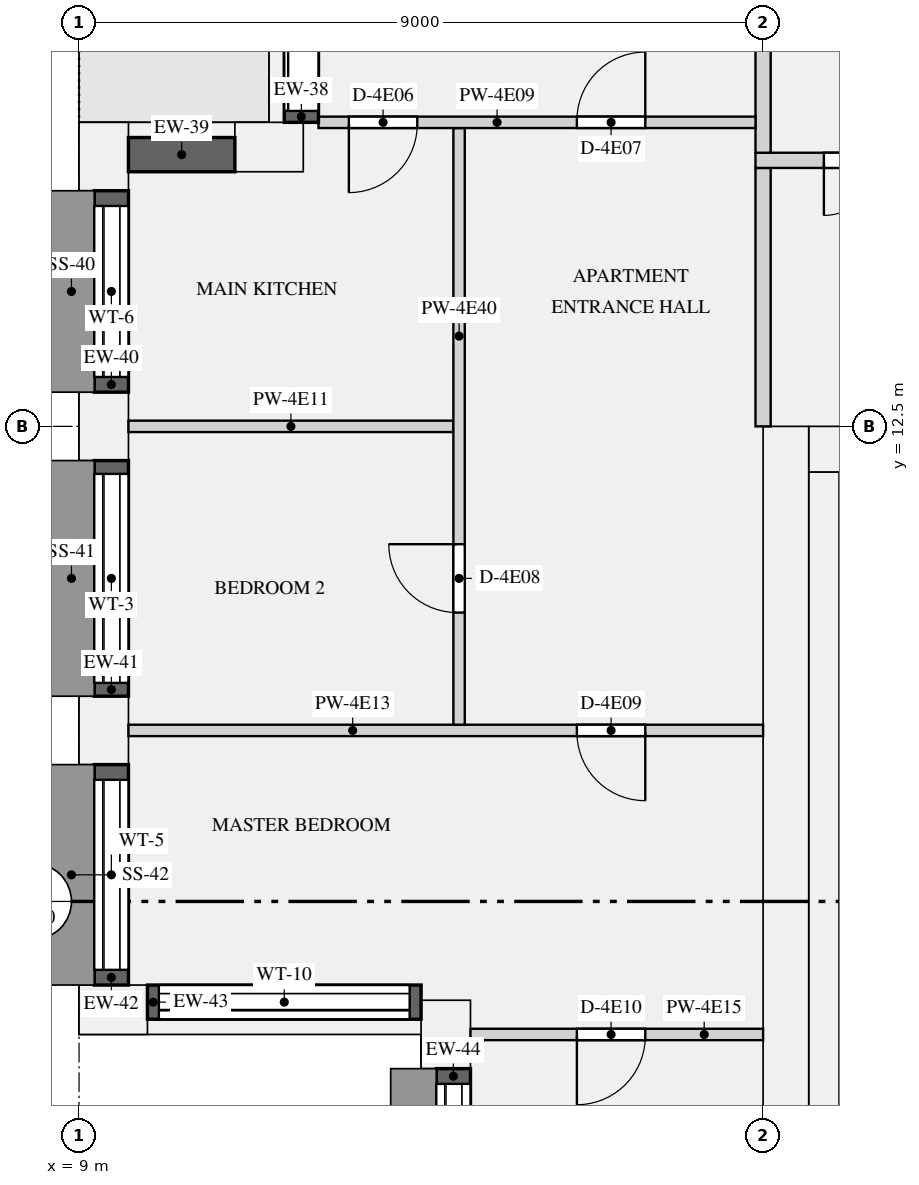
"""IFC4 building model, lengths in metres.
Left out: names, types, materials, properties, quantities, classifications, styles, units other than length and angle.
Written with IfcOpenShell. Run it as: python <this file> out.ifc"""

import sys

from ifc_helpers import new_model, si_unit, direction, frame, frame_2d, origin, origin_2d, place, context, subcontext, project, spatial, rectangle, extrude, element, fill, save


model = new_model("IFC4")
c1 = context("Model", 3, precision=1e-05, world=origin(), true_north=direction((0.0, 1.0)))
c2 = subcontext(c1, "Body", "Model", "MODEL_VIEW")
j1 = project(units=[si_unit("LENGTHUNIT", "METRE"), si_unit("PLANEANGLEUNIT", "RADIAN")], contexts=[c1])
p1 = place(None, origin())
s1 = spatial("IfcSite", under=j1, at=p1, CompositionType="ELEMENT")
p2 = place(p1, origin())
s2 = spatial("IfcBuilding", under=s1, at=p2, CompositionType="ELEMENT")
p3 = place(p2, frame((0.0, 0.0, 229.5)))
s3 = spatial("IfcBuildingStorey", under=s2, at=p3, CompositionType="ELEMENT", Elevation=229.5)
for number, where, z_axis, x_axis in (
    (1, (11.5, 16.175, 0.0), (0.0, 0.0, 1.0), (-1.0, 0.0, 0.0)),
    (2, (9.325, 16.05, 0.0), (0.0, 0.0, 1.0), (0.0, -1.0, 0.0)),
    (3, (9.325, 12.5, 0.0), (0.0, 0.0, 1.0), (0.0, -1.0, 0.0)),
    (4, (9.325, 8.5, 0.0), (0.0, 0.0, 1.0), (0.0, -1.0, 0.0)),
    (5, (9.45, 4.825, 0.0), (0.0, 0.0, 1.0), (1.0, 0.0, 0.0)),
    (6, (13.825, 4.5, 0.0), (0.0, 0.0, 1.0), (0.0, -1.0, 0.0)),
):
    element("IfcColumn", number, at=place(p3, frame(where, z_axis=z_axis, x_axis=x_axis)), inside=s3, PredefinedType="USERDEFINED", context=c2, shape_type="SweptSolid", body=[
        extrude(rectangle(XDim=0.9, YDim=0.65, at=origin_2d()), origin(), (0.0, 0.0, 1.0), 3.15),
    ])
p4 = place(p3, frame((18.3, 0.0, 0.0), z_axis=(0.0, 0.0, 1.0), x_axis=(0.0, 1.0, 0.0)))
e7 = element("IfcWall", 7, at=p4, inside=s3, PredefinedType="SHEAR", context=c2, shape_type="SweptSolid", body=[
    extrude(rectangle(XDim=12.5, YDim=0.6, at=frame_2d((6.25, 0.0))), origin(), (0.0, 0.0, 1.0), 3.15),
])
p5 = place(p3, frame((18.6, 12.2, 0.0), z_axis=(0.0, 0.0, 1.0), x_axis=(1.0, 0.0, 0.0)))
e8 = element("IfcWall", 8, at=p5, inside=s3, PredefinedType="SHEAR", context=c2, shape_type="SweptSolid", body=[
    extrude(rectangle(XDim=34.8, YDim=0.6, at=frame_2d((17.4, 0.0))), origin(), (0.0, 0.0, 1.0), 3.15),
])
p6 = place(p5, frame((24.575, 0.0, 0.0)))
e9 = element("IfcOpeningElement", 9, at=p6, cuts=e8, PredefinedType="OPENING", context=c2, shape_type="SweptSolid", body=[
    extrude(rectangle(XDim=1.1, YDim=2.1, at=frame_2d((0.55, 1.05))), frame((0.0, 0.31, 0.0), z_axis=(0.0, -1.0, 0.0), x_axis=(1.0, 0.0, 0.0)), (0.0, 0.0, 1.0), 0.62),
])
p7 = place(p5, frame((26.825, 0.0, 0.0)))
e10 = element("IfcOpeningElement", 10, at=p7, cuts=e8, PredefinedType="OPENING", context=c2, shape_type="SweptSolid", body=[
    extrude(rectangle(XDim=1.1, YDim=2.1, at=frame_2d((0.55, 1.05))), frame((0.0, 0.31, 0.0), z_axis=(0.0, -1.0, 0.0), x_axis=(1.0, 0.0, 0.0)), (0.0, 0.0, 1.0), 0.62),
])
p8 = place(p5, frame((29.075, 0.0, 0.0)))
e11 = element("IfcOpeningElement", 11, at=p8, cuts=e8, PredefinedType="OPENING", context=c2, shape_type="SweptSolid", body=[
    extrude(rectangle(XDim=1.1, YDim=2.1, at=frame_2d((0.55, 1.05))), frame((0.0, 0.31, 0.0), z_axis=(0.0, -1.0, 0.0), x_axis=(1.0, 0.0, 0.0)), (0.0, 0.0, 1.0), 0.62),
])
p9 = place(p5, frame((4.95, 0.0, 0.0)))
e12 = element("IfcOpeningElement", 12, at=p9, cuts=e8, PredefinedType="OPENING", context=c2, shape_type="SweptSolid", body=[
    extrude(rectangle(XDim=0.9, YDim=2.1, at=frame_2d((0.45, 1.05))), frame((0.0, 0.31, 0.0), z_axis=(0.0, -1.0, 0.0), x_axis=(1.0, 0.0, 0.0)), (0.0, 0.0, 1.0), 0.62),
])
p10 = place(p5, frame((11.95, 0.0, 0.0)))
e13 = element("IfcOpeningElement", 13, at=p10, cuts=e8, PredefinedType="OPENING", context=c2, shape_type="SweptSolid", body=[
    extrude(rectangle(XDim=0.9, YDim=2.1, at=frame_2d((0.45, 1.05))), frame((0.0, 0.31, 0.0), z_axis=(0.0, -1.0, 0.0), x_axis=(1.0, 0.0, 0.0)), (0.0, 0.0, 1.0), 0.62),
])
p11 = place(p5, frame((18.45, 0.0, 0.0)))
e14 = element("IfcOpeningElement", 14, at=p11, cuts=e8, PredefinedType="OPENING", context=c2, shape_type="SweptSolid", body=[
    extrude(rectangle(XDim=0.9, YDim=2.1, at=frame_2d((0.45, 1.05))), frame((0.0, 0.31, 0.0), z_axis=(0.0, -1.0, 0.0), x_axis=(1.0, 0.0, 0.0)), (0.0, 0.0, 1.0), 0.62),
])
p12 = place(p5, frame((1.55, 0.0, 0.0)))
e15 = element("IfcOpeningElement", 15, at=p12, cuts=e8, PredefinedType="OPENING", context=c2, shape_type="SweptSolid", body=[
    extrude(rectangle(XDim=1.2, YDim=2.1, at=frame_2d((0.6, 1.05))), frame((0.0, 0.31, 0.0), z_axis=(0.0, -1.0, 0.0), x_axis=(1.0, 0.0, 0.0)), (0.0, 0.0, 1.0), 0.62),
])
p13 = place(p5, frame((32.05, 0.0, 0.0)))
e16 = element("IfcOpeningElement", 16, at=p13, cuts=e8, PredefinedType="OPENING", context=c2, shape_type="SweptSolid", body=[
    extrude(rectangle(XDim=1.2, YDim=2.1, at=frame_2d((0.6, 1.05))), frame((0.0, 0.31, 0.0), z_axis=(0.0, -1.0, 0.0), x_axis=(1.0, 0.0, 0.0)), (0.0, 0.0, 1.0), 0.62),
])
p14 = place(p3, frame((18.8, 1.0, 0.0), z_axis=(0.0, 0.0, 1.0), x_axis=(0.0, 1.0, 0.0)))
e17 = element("IfcWall", 17, at=p14, inside=s3, PredefinedType="SHEAR", context=c2, shape_type="SweptSolid", body=[
    extrude(rectangle(XDim=10.9, YDim=0.4, at=frame_2d((5.45, 0.0))), origin(), (0.0, 0.0, 1.0), 3.15),
])
p15 = place(p3, frame((11.925, 20.05, 0.0), z_axis=(0.0, 0.0, 1.0), x_axis=(0.0, -1.0, 0.0)))
e18 = element("IfcWall", 18, at=p15, inside=s3, PredefinedType="SOLIDWALL", context=c2, shape_type="SweptSolid", body=[
    extrude(rectangle(XDim=3.55, YDim=0.45, at=frame_2d((1.775, 0.0))), origin(), (0.0, 0.0, 1.0), 2.83),
])
p16 = place(p15, frame((0.15, 0.0, 0.0)))
e19 = element("IfcOpeningElement", 19, at=p16, cuts=e18, PredefinedType="OPENING", context=c2, shape_type="SweptSolid", body=[
    extrude(rectangle(XDim=3.25, YDim=2.3, at=frame_2d((1.625, 1.15))), frame((0.0, 0.235, 0.0), z_axis=(0.0, -1.0, 0.0), x_axis=(1.0, 0.0, 0.0)), (0.0, 0.0, 1.0), 0.47),
])
p17 = place(p3, frame((11.05, 16.075, 0.9), z_axis=(0.0, 0.0, 1.0), x_axis=(-1.0, 0.0, 0.0)))
e20 = element("IfcWall", 20, at=p17, inside=s3, PredefinedType="SOLIDWALL", context=c2, shape_type="SweptSolid", body=[
    extrude(rectangle(XDim=1.4, YDim=0.45, at=frame_2d((0.7, 0.0))), origin(), (0.0, 0.0, 1.0), 1.93),
])
p18 = place(p3, frame((9.425, 15.6, 0.9), z_axis=(0.0, 0.0, 1.0), x_axis=(0.0, -1.0, 0.0)))
e21 = element("IfcWall", 21, at=p18, inside=s3, PredefinedType="SOLIDWALL", context=c2, shape_type="SweptSolid", body=[
    extrude(rectangle(XDim=2.65, YDim=0.45, at=frame_2d((1.325, 0.0))), origin(), (0.0, 0.0, 1.0), 1.93),
])
p19 = place(p18, frame((0.2, 0.0, 0.15)))
e22 = element("IfcOpeningElement", 22, at=p19, cuts=e21, PredefinedType="OPENING", context=c2, shape_type="SweptSolid", body=[
    extrude(rectangle(XDim=2.25, YDim=1.5, at=frame_2d((1.125, 0.75))), frame((0.0, 0.235, 0.0), z_axis=(0.0, -1.0, 0.0), x_axis=(1.0, 0.0, 0.0)), (0.0, 0.0, 1.0), 0.47),
])
p20 = place(p3, frame((9.425, 12.05, 0.9), z_axis=(0.0, 0.0, 1.0), x_axis=(0.0, -1.0, 0.0)))
e23 = element("IfcWall", 23, at=p20, inside=s3, PredefinedType="SOLIDWALL", context=c2, shape_type="SweptSolid", body=[
    extrude(rectangle(XDim=3.1, YDim=0.45, at=frame_2d((1.55, 0.0))), origin(), (0.0, 0.0, 1.0), 1.93),
])
p21 = place(p20, frame((0.175, 0.0, 0.15)))
e24 = element("IfcOpeningElement", 24, at=p21, cuts=e23, PredefinedType="OPENING", context=c2, shape_type="SweptSolid", body=[
    extrude(rectangle(XDim=2.75, YDim=1.5, at=frame_2d((1.375, 0.75))), frame((0.0, 0.235, 0.0), z_axis=(0.0, -1.0, 0.0), x_axis=(1.0, 0.0, 0.0)), (0.0, 0.0, 1.0), 0.47),
])
p22 = place(p3, frame((9.425, 8.05, 0.9), z_axis=(0.0, 0.0, 1.0), x_axis=(0.0, -1.0, 0.0)))
e25 = element("IfcWall", 25, at=p22, inside=s3, PredefinedType="SOLIDWALL", context=c2, shape_type="SweptSolid", body=[
    extrude(rectangle(XDim=2.9, YDim=0.45, at=frame_2d((1.45, 0.0))), origin(), (0.0, 0.0, 1.0), 1.93),
])
p23 = place(p22, frame((0.2, 0.0, 0.15)))
e26 = element("IfcOpeningElement", 26, at=p23, cuts=e25, PredefinedType="OPENING", context=c2, shape_type="SweptSolid", body=[
    extrude(rectangle(XDim=2.5, YDim=1.5, at=frame_2d((1.25, 0.75))), frame((0.0, 0.235, 0.0), z_axis=(0.0, -1.0, 0.0), x_axis=(1.0, 0.0, 0.0)), (0.0, 0.0, 1.0), 0.47),
])
p24 = place(p3, frame((9.9, 4.925, 0.9), z_axis=(0.0, 0.0, 1.0), x_axis=(1.0, 0.0, 0.0)))
e27 = element("IfcWall", 27, at=p24, inside=s3, PredefinedType="SOLIDWALL", context=c2, shape_type="SweptSolid", body=[
    extrude(rectangle(XDim=3.6, YDim=0.45, at=frame_2d((1.8, 0.0))), origin(), (0.0, 0.0, 1.0), 1.93),
])
p25 = place(p24, frame((0.15, 0.0, 0.15)))
e28 = element("IfcOpeningElement", 28, at=p25, cuts=e27, PredefinedType="OPENING", context=c2, shape_type="SweptSolid", body=[
    extrude(rectangle(XDim=3.3, YDim=1.5, at=frame_2d((1.65, 0.75))), frame((0.0, 0.235, 0.0), z_axis=(0.0, -1.0, 0.0), x_axis=(1.0, 0.0, 0.0)), (0.0, 0.0, 1.0), 0.47),
])
p26 = place(p3, frame((13.925, 4.05, 0.9), z_axis=(0.0, 0.0, 1.0), x_axis=(0.0, -1.0, 0.0)))
e29 = element("IfcWall", 29, at=p26, inside=s3, PredefinedType="SOLIDWALL", context=c2, shape_type="SweptSolid", body=[
    extrude(rectangle(XDim=3.4, YDim=0.45, at=frame_2d((1.7, 0.0))), origin(), (0.0, 0.0, 1.0), 1.93),
])
p27 = place(p26, frame((0.2, 0.0, 0.15)))
e30 = element("IfcOpeningElement", 30, at=p27, cuts=e29, PredefinedType="OPENING", context=c2, shape_type="SweptSolid", body=[
    extrude(rectangle(XDim=3.0, YDim=1.5, at=frame_2d((1.5, 0.75))), frame((0.0, 0.235, 0.0), z_axis=(0.0, -1.0, 0.0), x_axis=(1.0, 0.0, 0.0)), (0.0, 0.0, 1.0), 0.47),
])
p28 = place(p3, frame((18.0, 12.5, 0.0), z_axis=(0.0, 0.0, 1.0), x_axis=(0.0, 1.0, 0.0)))
e31 = element("IfcWall", 31, at=p28, inside=s3, PredefinedType="PARTITIONING", context=c2, shape_type="SweptSolid", body=[
    extrude(rectangle(XDim=3.4, YDim=0.2, at=frame_2d((1.7, 0.0))), origin(), (0.0, 0.0, 1.0), 2.83),
])
p29 = place(p3, frame((12.15, 16.5, 0.0), z_axis=(0.0, 0.0, 1.0), x_axis=(1.0, 0.0, 0.0)))
e32 = element("IfcWall", 32, at=p29, inside=s3, PredefinedType="PARTITIONING", context=c2, shape_type="SweptSolid", body=[
    extrude(rectangle(XDim=5.75, YDim=0.15, at=frame_2d((2.875, 0.0))), origin(), (0.0, 0.0, 1.0), 2.83),
])
p30 = place(p29, frame((0.4, 0.0, 0.0)))
e33 = element("IfcOpeningElement", 33, at=p30, cuts=e32, PredefinedType="OPENING", context=c2, shape_type="SweptSolid", body=[
    extrude(rectangle(XDim=0.9, YDim=2.1, at=frame_2d((0.45, 1.05))), frame((0.0, 0.085, 0.0), z_axis=(0.0, -1.0, 0.0), x_axis=(1.0, 0.0, 0.0)), (0.0, 0.0, 1.0), 0.17),
])
p31 = place(p29, frame((3.4, 0.0, 0.0)))
e34 = element("IfcOpeningElement", 34, at=p31, cuts=e32, PredefinedType="OPENING", context=c2, shape_type="SweptSolid", body=[
    extrude(rectangle(XDim=0.9, YDim=2.1, at=frame_2d((0.45, 1.05))), frame((0.0, 0.085, 0.0), z_axis=(0.0, -1.0, 0.0), x_axis=(1.0, 0.0, 0.0)), (0.0, 0.0, 1.0), 0.17),
])
p32 = place(p3, frame((9.65, 12.5, 0.0), z_axis=(0.0, 0.0, 1.0), x_axis=(1.0, 0.0, 0.0)))
e35 = element("IfcWall", 35, at=p32, inside=s3, PredefinedType="PARTITIONING", context=c2, shape_type="SweptSolid", body=[
    extrude(rectangle(XDim=4.275, YDim=0.15, at=frame_2d((2.138, 0.0))), origin(), (0.0, 0.0, 1.0), 2.83),
])
p33 = place(p3, frame((9.65, 8.5, 0.0), z_axis=(0.0, 0.0, 1.0), x_axis=(1.0, 0.0, 0.0)))
e36 = element("IfcWall", 36, at=p33, inside=s3, PredefinedType="PARTITIONING", context=c2, shape_type="SweptSolid", body=[
    extrude(rectangle(XDim=8.35, YDim=0.15, at=frame_2d((4.175, 0.0))), origin(), (0.0, 0.0, 1.0), 2.83),
])
p34 = place(p33, frame((5.9, 0.0, 0.0)))
e37 = element("IfcOpeningElement", 37, at=p34, cuts=e36, PredefinedType="OPENING", context=c2, shape_type="SweptSolid", body=[
    extrude(rectangle(XDim=0.9, YDim=2.1, at=frame_2d((0.45, 1.05))), frame((0.0, 0.085, 0.0), z_axis=(0.0, -1.0, 0.0), x_axis=(1.0, 0.0, 0.0)), (0.0, 0.0, 1.0), 0.17),
])
p35 = place(p3, frame((14.15, 4.5, 0.0), z_axis=(0.0, 0.0, 1.0), x_axis=(1.0, 0.0, 0.0)))
e38 = element("IfcWall", 38, at=p35, inside=s3, PredefinedType="PARTITIONING", context=c2, shape_type="SweptSolid", body=[
    extrude(rectangle(XDim=3.85, YDim=0.15, at=frame_2d((1.925, 0.0))), origin(), (0.0, 0.0, 1.0), 2.83),
])
p36 = place(p35, frame((1.4, 0.0, 0.0)))
e39 = element("IfcOpeningElement", 39, at=p36, cuts=e38, PredefinedType="OPENING", context=c2, shape_type="SweptSolid", body=[
    extrude(rectangle(XDim=0.9, YDim=2.1, at=frame_2d((0.45, 1.05))), frame((0.0, 0.085, 0.0), z_axis=(0.0, -1.0, 0.0), x_axis=(1.0, 0.0, 0.0)), (0.0, 0.0, 1.0), 0.17),
])
p37 = place(p3, frame((17.9, 16.0, 0.0), z_axis=(0.0, 0.0, 1.0), x_axis=(1.0, 0.0, 0.0)))
e40 = element("IfcWall", 40, at=p37, inside=s3, PredefinedType="PARTITIONING", context=c2, shape_type="SweptSolid", body=[
    extrude(rectangle(XDim=36.2, YDim=0.2, at=frame_2d((18.1, 0.0))), origin(), (0.0, 0.0, 1.0), 2.83),
])
p38 = place(p37, frame((0.9, 0.0, 0.0)))
e41 = element("IfcOpeningElement", 41, at=p38, cuts=e40, PredefinedType="OPENING", context=c2, shape_type="SweptSolid", body=[
    extrude(rectangle(XDim=1.4, YDim=2.1, at=frame_2d((0.7, 1.05))), frame((0.0, 0.11, 0.0), z_axis=(0.0, -1.0, 0.0), x_axis=(1.0, 0.0, 0.0)), (0.0, 0.0, 1.0), 0.22),
])
p39 = place(p37, frame((33.9, 0.0, 0.0)))
e42 = element("IfcOpeningElement", 42, at=p39, cuts=e40, PredefinedType="OPENING", context=c2, shape_type="SweptSolid", body=[
    extrude(rectangle(XDim=1.4, YDim=2.1, at=frame_2d((0.7, 1.05))), frame((0.0, 0.11, 0.0), z_axis=(0.0, -1.0, 0.0), x_axis=(1.0, 0.0, 0.0)), (0.0, 0.0, 1.0), 0.22),
])
p40 = place(p3, frame((18.0, 16.1, 0.0), z_axis=(0.0, 0.0, 1.0), x_axis=(0.0, 1.0, 0.0)))
e43 = element("IfcWall", 43, at=p40, inside=s3, PredefinedType="PARTITIONING", context=c2, shape_type="SweptSolid", body=[
    extrude(rectangle(XDim=7.8, YDim=0.2, at=frame_2d((3.9, 0.0))), origin(), (0.0, 0.0, 1.0), 2.83),
])
p41 = place(p40, frame((5.35, 0.0, 0.0)))
e44 = element("IfcOpeningElement", 44, at=p41, cuts=e43, PredefinedType="OPENING", context=c2, shape_type="SweptSolid", body=[
    extrude(rectangle(XDim=1.1, YDim=2.1, at=frame_2d((0.55, 1.05))), frame((0.0, 0.11, 0.0), z_axis=(0.0, -1.0, 0.0), x_axis=(1.0, 0.0, 0.0)), (0.0, 0.0, 1.0), 0.22),
])
p42 = place(p3, frame((14.0, 8.575, 0.0), z_axis=(0.0, 0.0, 1.0), x_axis=(0.0, 1.0, 0.0)))
e45 = element("IfcWall", 45, at=p42, inside=s3, PredefinedType="PARTITIONING", context=c2, shape_type="SweptSolid", body=[
    extrude(rectangle(XDim=7.85, YDim=0.15, at=frame_2d((3.925, 0.0))), origin(), (0.0, 0.0, 1.0), 2.83),
])
p43 = place(p42, frame((1.475, 0.0, 0.0)))
e46 = element("IfcOpeningElement", 46, at=p43, cuts=e45, PredefinedType="OPENING", context=c2, shape_type="SweptSolid", body=[
    extrude(rectangle(XDim=0.9, YDim=2.1, at=frame_2d((0.45, 1.05))), frame((0.0, 0.085, 0.0), z_axis=(0.0, -1.0, 0.0), x_axis=(1.0, 0.0, 0.0)), (0.0, 0.0, 1.0), 0.17),
])
p44 = place(p16, origin())
e47 = element("IfcDoor", 47, at=p44, inside=s3, OperationType="SLIDING_TO_LEFT", PredefinedType="DOOR", context=c2, shape_type="SweptSolid", body=[
    extrude(rectangle(XDim=3.25, YDim=2.3, at=frame_2d((1.625, 1.15))), frame((0.0, -0.07, 0.0), z_axis=(0.0, -1.0, 0.0), x_axis=(1.0, 0.0, 0.0)), (0.0, 0.0, 1.0), 0.05),
])
fill(e19, e47)
p45 = place(p19, origin())
e48 = element("IfcWindow", 48, at=p45, inside=s3, PartitioningType="SINGLE_PANEL", PredefinedType="WINDOW", context=c2, shape_type="SweptSolid", body=[
    extrude(rectangle(XDim=2.25, YDim=1.5, at=frame_2d((1.125, 0.75))), frame((0.0, -0.065, 0.0), z_axis=(0.0, -1.0, 0.0), x_axis=(1.0, 0.0, 0.0)), (0.0, 0.0, 1.0), 0.06),
])
fill(e22, e48)
p46 = place(p21, origin())
e49 = element("IfcWindow", 49, at=p46, inside=s3, PartitioningType="SINGLE_PANEL", PredefinedType="WINDOW", context=c2, shape_type="SweptSolid", body=[
    extrude(rectangle(XDim=2.75, YDim=1.5, at=frame_2d((1.375, 0.75))), frame((0.0, -0.065, 0.0), z_axis=(0.0, -1.0, 0.0), x_axis=(1.0, 0.0, 0.0)), (0.0, 0.0, 1.0), 0.06),
])
fill(e24, e49)
p47 = place(p23, origin())
e50 = element("IfcWindow", 50, at=p47, inside=s3, PartitioningType="SINGLE_PANEL", PredefinedType="WINDOW", context=c2, shape_type="SweptSolid", body=[
    extrude(rectangle(XDim=2.5, YDim=1.5, at=frame_2d((1.25, 0.75))), frame((0.0, -0.065, 0.0), z_axis=(0.0, -1.0, 0.0), x_axis=(1.0, 0.0, 0.0)), (0.0, 0.0, 1.0), 0.06),
])
fill(e26, e50)
p48 = place(p25, origin())
e51 = element("IfcWindow", 51, at=p48, inside=s3, PartitioningType="SINGLE_PANEL", PredefinedType="WINDOW", context=c2, shape_type="SweptSolid", body=[
    extrude(rectangle(XDim=3.3, YDim=1.5, at=frame_2d((1.65, 0.75))), frame((0.0, -0.065, 0.0), z_axis=(0.0, -1.0, 0.0), x_axis=(1.0, 0.0, 0.0)), (0.0, 0.0, 1.0), 0.06),
])
fill(e28, e51)
p49 = place(p27, origin())
e52 = element("IfcWindow", 52, at=p49, inside=s3, PartitioningType="SINGLE_PANEL", PredefinedType="WINDOW", context=c2, shape_type="SweptSolid", body=[
    extrude(rectangle(XDim=3.0, YDim=1.5, at=frame_2d((1.5, 0.75))), frame((0.0, -0.065, 0.0), z_axis=(0.0, -1.0, 0.0), x_axis=(1.0, 0.0, 0.0)), (0.0, 0.0, 1.0), 0.06),
])
fill(e30, e52)
p50 = place(p38, frame((1.4, 0.0, 0.0), z_axis=(0.0, 0.0, 1.0), x_axis=(-1.0, 0.0, 0.0)))
e53 = element("IfcDoor", 53, at=p50, inside=s3, OperationType="DOUBLE_DOOR_SINGLE_SWING", PredefinedType="DOOR", context=c2, shape_type="SweptSolid", body=[
    extrude(rectangle(XDim=1.4, YDim=2.1, at=frame_2d((0.7, 1.05))), frame((0.0, 0.025, 0.0), z_axis=(0.0, -1.0, 0.0), x_axis=(1.0, 0.0, 0.0)), (0.0, 0.0, 1.0), 0.05),
])
fill(e41, e53)
p51 = place(p30, frame((0.9, 0.0, 0.0), z_axis=(0.0, 0.0, 1.0), x_axis=(-1.0, 0.0, 0.0)))
e54 = element("IfcDoor", 54, at=p51, inside=s3, OperationType="SINGLE_SWING_RIGHT", PredefinedType="DOOR", context=c2, shape_type="SweptSolid", body=[
    extrude(rectangle(XDim=0.9, YDim=2.1, at=frame_2d((0.45, 1.05))), frame((0.0, 0.025, 0.0), z_axis=(0.0, -1.0, 0.0), x_axis=(1.0, 0.0, 0.0)), (0.0, 0.0, 1.0), 0.05),
])
fill(e33, e54)
p52 = place(p31, origin())
e55 = element("IfcDoor", 55, at=p52, inside=s3, OperationType="SINGLE_SWING_RIGHT", PredefinedType="DOOR", context=c2, shape_type="SweptSolid", body=[
    extrude(rectangle(XDim=0.9, YDim=2.1, at=frame_2d((0.45, 1.05))), frame((0.0, 0.025, 0.0), z_axis=(0.0, -1.0, 0.0), x_axis=(1.0, 0.0, 0.0)), (0.0, 0.0, 1.0), 0.05),
])
fill(e34, e55)
p53 = place(p43, origin())
e56 = element("IfcDoor", 56, at=p53, inside=s3, OperationType="SINGLE_SWING_RIGHT", PredefinedType="DOOR", context=c2, shape_type="SweptSolid", body=[
    extrude(rectangle(XDim=0.9, YDim=2.1, at=frame_2d((0.45, 1.05))), frame((0.0, 0.025, 0.0), z_axis=(0.0, -1.0, 0.0), x_axis=(1.0, 0.0, 0.0)), (0.0, 0.0, 1.0), 0.05),
])
fill(e46, e56)
p54 = place(p34, frame((0.9, 0.0, 0.0), z_axis=(0.0, 0.0, 1.0), x_axis=(-1.0, 0.0, 0.0)))
e57 = element("IfcDoor", 57, at=p54, inside=s3, OperationType="SINGLE_SWING_LEFT", PredefinedType="DOOR", context=c2, shape_type="SweptSolid", body=[
    extrude(rectangle(XDim=0.9, YDim=2.1, at=frame_2d((0.45, 1.05))), frame((0.0, 0.025, 0.0), z_axis=(0.0, -1.0, 0.0), x_axis=(1.0, 0.0, 0.0)), (0.0, 0.0, 1.0), 0.05),
])
fill(e37, e57)
p55 = place(p36, frame((0.9, 0.0, 0.0), z_axis=(0.0, 0.0, 1.0), x_axis=(-1.0, 0.0, 0.0)))
e58 = element("IfcDoor", 58, at=p55, inside=s3, OperationType="SINGLE_SWING_RIGHT", PredefinedType="DOOR", context=c2, shape_type="SweptSolid", body=[
    extrude(rectangle(XDim=0.9, YDim=2.1, at=frame_2d((0.45, 1.05))), frame((0.0, 0.025, 0.0), z_axis=(0.0, -1.0, 0.0), x_axis=(1.0, 0.0, 0.0)), (0.0, 0.0, 1.0), 0.05),
])
fill(e39, e58)
save(model, sys.argv[1])
